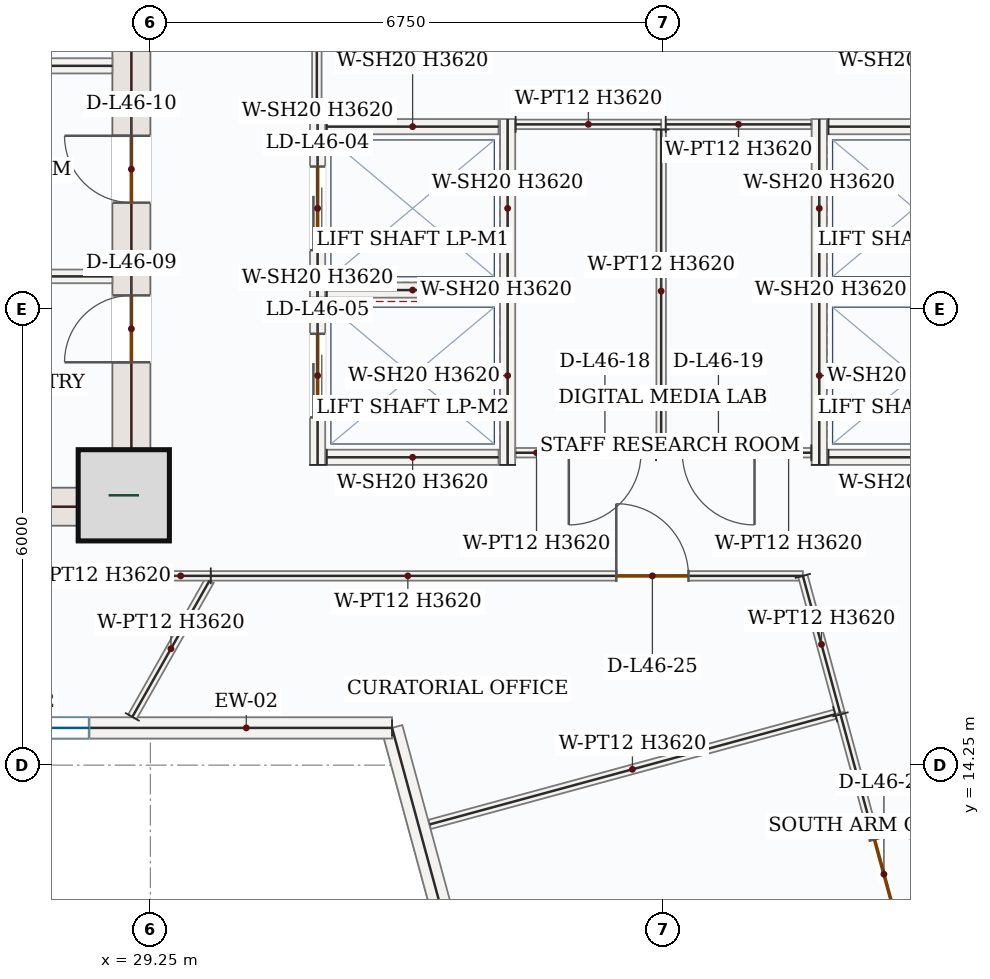
"""IFC4 building model, lengths in metres.
Left out: names, types, materials, properties, quantities, classifications, styles, units other than length and angle.
Written with IfcOpenShell. Run it as: python <this file> out.ifc"""

import sys

from ifc_helpers import new_model, si_unit, direction, frame, frame_2d, origin, origin_2d, place, context, subcontext, project, spatial, rectangle, extrude, source, transform, mapped, element, fill, save


model = new_model("IFC4")
c1 = context("Model", 3, precision=1e-05, world=origin(), true_north=direction((0.0, 1.0)))
c2 = subcontext(c1, "Body", "Model", "MODEL_VIEW")
j1 = project(units=[si_unit("LENGTHUNIT", "METRE"), si_unit("PLANEANGLEUNIT", "RADIAN")], contexts=[c1])
p1 = place(None, origin())
s1 = spatial("IfcSite", under=j1, at=p1, CompositionType="ELEMENT")
p2 = place(p1, origin())
s2 = spatial("IfcBuilding", under=s1, at=p2, CompositionType="ELEMENT")
p3 = place(p2, frame((0.0, 0.0, 198.0)))
s3 = spatial("IfcBuildingStorey", under=s2, at=p3, CompositionType="ELEMENT", Elevation=198.0)
p4 = place(p3, frame((29.0, 17.4, 0.0), z_axis=(0.0, 0.0, 1.0), x_axis=(0.0, 1.0, 0.0)))
e1 = element("IfcWall", 1, at=p4, inside=s3, PredefinedType="SHEAR", context=c2, shape_type="SweptSolid", body=[
    extrude(rectangle(XDim=8.55, YDim=0.5, at=frame_2d((4.275, 0.0))), origin(), (0.0, 0.0, 1.0), 3.62),
])
p5 = place(p4, frame((6.65, 0.0, 0.0)))
e2 = element("IfcOpeningElement", 2, at=p5, cuts=e1, PredefinedType="OPENING", context=c2, shape_type="SweptSolid", body=[
    extrude(rectangle(XDim=1.1, YDim=2.2, at=frame_2d((0.55, 1.1))), frame((0.0, 0.26, 0.0), z_axis=(0.0, -1.0, 0.0), x_axis=(1.0, 0.0, 0.0)), (0.0, 0.0, 1.0), 0.52),
])
p6 = place(p4, frame((2.15, 0.0, 0.0)))
e3 = element("IfcOpeningElement", 3, at=p6, cuts=e1, PredefinedType="OPENING", context=c2, shape_type="SweptSolid", body=[
    extrude(rectangle(XDim=0.88, YDim=2.1, at=frame_2d((0.44, 1.05))), frame((0.0, 0.26, 0.0), z_axis=(0.0, -1.0, 0.0), x_axis=(1.0, 0.0, 0.0)), (0.0, 0.0, 1.0), 0.52),
])
p7 = place(p4, frame((4.25, 0.0, 0.0)))
e4 = element("IfcOpeningElement", 4, at=p7, cuts=e1, PredefinedType="OPENING", context=c2, shape_type="SweptSolid", body=[
    extrude(rectangle(XDim=0.88, YDim=2.1, at=frame_2d((0.44, 1.05))), frame((0.0, 0.26, 0.0), z_axis=(0.0, -1.0, 0.0), x_axis=(1.0, 0.0, 0.0)), (0.0, 0.0, 1.0), 0.52),
])
m1 = source(origin(), c2, "Body", "SweptSolid", [
    extrude(rectangle(XDim=7.0, YDim=0.5, at=frame_2d((3.5, 0.0))), origin(), (0.0, 0.0, 1.0), 3.62),
])
p8 = place(p3, frame((21.75, 17.65, 0.0), z_axis=(0.0, 0.0, 1.0), x_axis=(1.0, 0.0, 0.0)))
e5 = element("IfcWall", 5, at=p8, inside=s3, PredefinedType="SHEAR", context=c2, shape_type="MappedRepresentation", body=[
    mapped(m1, transform((0.0, 0.0, 0.0), x_axis=(1.0, 0.0, 0.0), y_axis=(0.0, 1.0, 0.0), z_axis=(0.0, 0.0, 1.0), scale=1.0)),
])
m2 = source(origin(), c2, "Body", "SweptSolid", [
    extrude(rectangle(XDim=1.2, YDim=1.2, at=origin_2d()), origin(), (0.0, 0.0, 1.0), 3.9),
])
p9 = place(p3, frame((28.9, 17.8, 0.0), z_axis=(0.0, 0.0, 1.0), x_axis=(1.0, 0.0, 0.0)))
e6 = element("IfcColumn", 6, at=p9, inside=s3, PredefinedType="COLUMN", context=c2, shape_type="MappedRepresentation", body=[
    mapped(m2, transform((0.0, 0.0, 0.0), x_axis=(1.0, 0.0, 0.0), y_axis=(0.0, 1.0, 0.0), z_axis=(0.0, 0.0, 1.0), scale=1.0)),
])
p10 = place(p3, frame((34.649, 6.571, 0.0), z_axis=(0.0, 0.0, 1.0), x_axis=(-0.262192380254, 0.965015624608, 0.0)))
e7 = element("IfcWall", 7, at=p10, inside=s3, PredefinedType="SOLIDWALL", context=c2, shape_type="SweptSolid", body=[
    extrude(rectangle(XDim=8.465, YDim=0.28, at=frame_2d((4.232, 0.0))), origin(), (0.0, 0.0, 1.0), 3.62),
])
p11 = place(p10, frame((3.333, 0.0, 0.85)))
e8 = element("IfcOpeningElement", 8, at=p11, cuts=e7, PredefinedType="OPENING", context=c2, shape_type="SweptSolid", body=[
    extrude(rectangle(XDim=1.8, YDim=1.75, at=frame_2d((0.9, 0.875))), frame((0.0, 0.15, 0.0), z_axis=(0.0, -1.0, 0.0), x_axis=(1.0, 0.0, 0.0)), (0.0, 0.0, 1.0), 0.3),
])
p12 = place(p3, frame((32.429, 14.74, 0.0), z_axis=(0.0, 0.0, 1.0), x_axis=(-1.0, 0.0, 0.0)))
e9 = element("IfcWall", 9, at=p12, inside=s3, PredefinedType="SOLIDWALL", context=c2, shape_type="SweptSolid", body=[
    extrude(rectangle(XDim=9.771, YDim=0.28, at=frame_2d((4.886, 0.0))), origin(), (0.0, 0.0, 1.0), 3.62),
])
p13 = place(p12, frame((3.986, 0.0, 0.85)))
e10 = element("IfcOpeningElement", 10, at=p13, cuts=e9, PredefinedType="OPENING", context=c2, shape_type="SweptSolid", body=[
    extrude(rectangle(XDim=1.8, YDim=1.75, at=frame_2d((0.9, 0.875))), frame((0.0, 0.15, 0.0), z_axis=(0.0, -1.0, 0.0), x_axis=(1.0, 0.0, 0.0)), (0.0, 0.0, 1.0), 0.3),
])
m3 = source(origin(), c2, "Body", "SweptSolid", [
    extrude(rectangle(XDim=2.75, YDim=0.2, at=frame_2d((1.375, 0.0))), origin(), (0.0, 0.0, 1.0), 3.62),
])
p14 = place(p3, frame((26.0, 23.45, 0.0), z_axis=(0.0, 0.0, 1.0), x_axis=(1.0, 0.0, 0.0)))
e11 = element("IfcWall", 11, at=p14, inside=s3, PredefinedType="SOLIDWALL", context=c2, shape_type="MappedRepresentation", body=[
    mapped(m3, transform((0.0, 0.0, 0.0), x_axis=(1.0, 0.0, 0.0), y_axis=(0.0, 1.0, 0.0), z_axis=(0.0, 0.0, 1.0), scale=1.0)),
])
m4 = source(origin(), c2, "Body", "SweptSolid", [
    extrude(rectangle(XDim=2.75, YDim=0.18, at=frame_2d((1.375, 0.0))), origin(), (0.0, 0.0, 1.0), 3.62),
])
p15 = place(p3, frame((26.0, 20.68, 0.0), z_axis=(0.0, 0.0, 1.0), x_axis=(1.0, 0.0, 0.0)))
e12 = element("IfcWall", 12, at=p15, inside=s3, PredefinedType="PARTITIONING", context=c2, shape_type="MappedRepresentation", body=[
    mapped(m4, transform((0.0, 0.0, 0.0), x_axis=(1.0, 0.0, 0.0), y_axis=(0.0, 1.0, 0.0), z_axis=(0.0, 0.0, 1.0), scale=1.0)),
])
p16 = place(p3, frame((31.45, 20.4, 0.0), z_axis=(0.0, 0.0, 1.0), x_axis=(0.0, 1.0, 0.0)))
e13 = element("IfcWall", 13, at=p16, inside=s3, PredefinedType="SOLIDWALL", context=c2, shape_type="SweptSolid", body=[
    extrude(rectangle(XDim=2.35, YDim=0.2, at=frame_2d((1.175, 0.0))), origin(), (0.0, 0.0, 1.0), 3.62),
])
p17 = place(p16, frame((0.625, 0.0, 0.0)))
e14 = element("IfcOpeningElement", 14, at=p17, cuts=e13, PredefinedType="OPENING", context=c2, shape_type="SweptSolid", body=[
    extrude(rectangle(XDim=1.1, YDim=2.15, at=frame_2d((0.55, 1.075))), frame((0.0, 0.11, 0.0), z_axis=(0.0, -1.0, 0.0), x_axis=(1.0, 0.0, 0.0)), (0.0, 0.0, 1.0), 0.22),
])
m5 = source(origin(), c2, "Body", "SweptSolid", [
    extrude(rectangle(XDim=2.35, YDim=0.2, at=frame_2d((1.175, 0.0))), origin(), (0.0, 0.0, 1.0), 3.62),
])
p18 = place(p3, frame((33.95, 20.4, 0.0), z_axis=(0.0, 0.0, 1.0), x_axis=(0.0, 1.0, 0.0)))
e15 = element("IfcWall", 15, at=p18, inside=s3, PredefinedType="SOLIDWALL", context=c2, shape_type="MappedRepresentation", body=[
    mapped(m5, transform((0.0, 0.0, 0.0), x_axis=(1.0, 0.0, 0.0), y_axis=(0.0, 1.0, 0.0), z_axis=(0.0, 0.0, 1.0), scale=1.0)),
])
m6 = source(origin(), c2, "Body", "SweptSolid", [
    extrude(rectangle(XDim=2.26, YDim=0.2, at=frame_2d((1.13, 0.0))), origin(), (0.0, 0.0, 1.0), 3.62),
])
for number, where, z_axis, x_axis in (
    (16, (31.57, 20.5, 0.0), (0.0, 0.0, 1.0), (1.0, 0.0, 0.0)),
    (17, (31.57, 22.65, 0.0), (0.0, 0.0, 1.0), (1.0, 0.0, 0.0)),
):
    element("IfcWall", number, at=place(p3, frame(where, z_axis=z_axis, x_axis=x_axis)), inside=s3, PredefinedType="SOLIDWALL", context=c2, shape_type="MappedRepresentation", body=[
        mapped(m6, transform((0.0, 0.0, 0.0), x_axis=(1.0, 0.0, 0.0), y_axis=(0.0, 1.0, 0.0), z_axis=(0.0, 0.0, 1.0), scale=1.0)),
    ])
p19 = place(p3, frame((31.45, 18.2, 0.0), z_axis=(0.0, 0.0, 1.0), x_axis=(0.0, 1.0, 0.0)))
e18 = element("IfcWall", 18, at=p19, inside=s3, PredefinedType="SOLIDWALL", context=c2, shape_type="SweptSolid", body=[
    extrude(rectangle(XDim=2.35, YDim=0.2, at=frame_2d((1.175, 0.0))), origin(), (0.0, 0.0, 1.0), 3.62),
])
p20 = place(p19, frame((0.625, 0.0, 0.0)))
e19 = element("IfcOpeningElement", 19, at=p20, cuts=e18, PredefinedType="OPENING", context=c2, shape_type="SweptSolid", body=[
    extrude(rectangle(XDim=1.1, YDim=2.15, at=frame_2d((0.55, 1.075))), frame((0.0, 0.11, 0.0), z_axis=(0.0, -1.0, 0.0), x_axis=(1.0, 0.0, 0.0)), (0.0, 0.0, 1.0), 0.22),
])
p21 = place(p3, frame((33.95, 18.2, 0.0), z_axis=(0.0, 0.0, 1.0), x_axis=(0.0, 1.0, 0.0)))
e20 = element("IfcWall", 20, at=p21, inside=s3, PredefinedType="SOLIDWALL", context=c2, shape_type="MappedRepresentation", body=[
    mapped(m5, transform((0.0, 0.0, 0.0), x_axis=(1.0, 0.0, 0.0), y_axis=(0.0, 1.0, 0.0), z_axis=(0.0, 0.0, 1.0), scale=1.0)),
])
p22 = place(p3, frame((31.57, 18.3, 0.0), z_axis=(0.0, 0.0, 1.0), x_axis=(1.0, 0.0, 0.0)))
e21 = element("IfcWall", 21, at=p22, inside=s3, PredefinedType="SOLIDWALL", context=c2, shape_type="MappedRepresentation", body=[
    mapped(m6, transform((0.0, 0.0, 0.0), x_axis=(1.0, 0.0, 0.0), y_axis=(0.0, 1.0, 0.0), z_axis=(0.0, 0.0, 1.0), scale=1.0)),
])
p23 = place(p3, frame((38.05, 20.4, 0.0), z_axis=(0.0, 0.0, 1.0), x_axis=(0.0, 1.0, 0.0)))
e22 = element("IfcWall", 22, at=p23, inside=s3, PredefinedType="SOLIDWALL", context=c2, shape_type="MappedRepresentation", body=[
    mapped(m5, transform((0.0, 0.0, 0.0), x_axis=(1.0, 0.0, 0.0), y_axis=(0.0, 1.0, 0.0), z_axis=(0.0, 0.0, 1.0), scale=1.0)),
])
for number, where, z_axis, x_axis in (
    (23, (38.17, 20.5, 0.0), (0.0, 0.0, 1.0), (1.0, 0.0, 0.0)),
    (24, (38.17, 22.65, 0.0), (0.0, 0.0, 1.0), (1.0, 0.0, 0.0)),
):
    element("IfcWall", number, at=place(p3, frame(where, z_axis=z_axis, x_axis=x_axis)), inside=s3, PredefinedType="SOLIDWALL", context=c2, shape_type="MappedRepresentation", body=[
        mapped(m6, transform((0.0, 0.0, 0.0), x_axis=(1.0, 0.0, 0.0), y_axis=(0.0, 1.0, 0.0), z_axis=(0.0, 0.0, 1.0), scale=1.0)),
    ])
p24 = place(p3, frame((38.05, 18.2, 0.0), z_axis=(0.0, 0.0, 1.0), x_axis=(0.0, 1.0, 0.0)))
e25 = element("IfcWall", 25, at=p24, inside=s3, PredefinedType="SOLIDWALL", context=c2, shape_type="MappedRepresentation", body=[
    mapped(m5, transform((0.0, 0.0, 0.0), x_axis=(1.0, 0.0, 0.0), y_axis=(0.0, 1.0, 0.0), z_axis=(0.0, 0.0, 1.0), scale=1.0)),
])
p25 = place(p3, frame((38.17, 18.3, 0.0), z_axis=(0.0, 0.0, 1.0), x_axis=(1.0, 0.0, 0.0)))
e26 = element("IfcWall", 26, at=p25, inside=s3, PredefinedType="SOLIDWALL", context=c2, shape_type="MappedRepresentation", body=[
    mapped(m6, transform((0.0, 0.0, 0.0), x_axis=(1.0, 0.0, 0.0), y_axis=(0.0, 1.0, 0.0), z_axis=(0.0, 0.0, 1.0), scale=1.0)),
])
m7 = source(origin(), c2, "Body", "SweptSolid", [
    extrude(rectangle(XDim=1.915, YDim=0.125, at=frame_2d((0.958, 0.0))), origin(), (0.0, 0.0, 1.0), 3.62),
])
p26 = place(p3, frame((34.055, 22.68, 0.0), z_axis=(0.0, 0.0, 1.0), x_axis=(1.0, 0.0, 0.0)))
e27 = element("IfcWall", 27, at=p26, inside=s3, PredefinedType="PARTITIONING", context=c2, shape_type="MappedRepresentation", body=[
    mapped(m7, transform((0.0, 0.0, 0.0), x_axis=(1.0, 0.0, 0.0), y_axis=(0.0, 1.0, 0.0), z_axis=(0.0, 0.0, 1.0), scale=1.0)),
])
m8 = source(origin(), c2, "Body", "SweptSolid", [
    extrude(rectangle(XDim=4.252, YDim=0.125, at=frame_2d((2.126, 0.0))), origin(), (0.0, 0.0, 1.0), 3.62),
])
p27 = place(p3, frame((35.97, 22.613, 0.0), z_axis=(0.0, 0.0, 1.0), x_axis=(0.0, -1.0, 0.0)))
e28 = element("IfcWall", 28, at=p27, inside=s3, PredefinedType="PARTITIONING", context=c2, shape_type="MappedRepresentation", body=[
    mapped(m8, transform((0.0, 0.0, 0.0), x_axis=(1.0, 0.0, 0.0), y_axis=(0.0, 1.0, 0.0), z_axis=(0.0, 0.0, 1.0), scale=1.0)),
])
p28 = place(p3, frame((35.903, 18.36, 0.0), z_axis=(0.0, 0.0, 1.0), x_axis=(-1.0, 0.0, 0.0)))
e29 = element("IfcWall", 29, at=p28, inside=s3, PredefinedType="PARTITIONING", context=c2, shape_type="SweptSolid", body=[
    extrude(rectangle(XDim=1.848, YDim=0.125, at=frame_2d((0.924, 0.0))), origin(), (0.0, 0.0, 1.0), 3.62),
])
p29 = place(p28, frame((0.198, 0.0, 0.0)))
e30 = element("IfcOpeningElement", 30, at=p29, cuts=e29, PredefinedType="OPENING", context=c2, shape_type="SweptSolid", body=[
    extrude(rectangle(XDim=0.95, YDim=2.15, at=frame_2d((0.475, 1.075))), frame((0.0, 0.073, 0.0), z_axis=(0.0, -1.0, 0.0), x_axis=(1.0, 0.0, 0.0)), (0.0, 0.0, 1.0), 0.145),
])
p30 = place(p3, frame((36.03, 22.68, 0.0), z_axis=(0.0, 0.0, 1.0), x_axis=(1.0, 0.0, 0.0)))
e31 = element("IfcWall", 31, at=p30, inside=s3, PredefinedType="PARTITIONING", context=c2, shape_type="MappedRepresentation", body=[
    mapped(m7, transform((0.0, 0.0, 0.0), x_axis=(1.0, 0.0, 0.0), y_axis=(0.0, 1.0, 0.0), z_axis=(0.0, 0.0, 1.0), scale=1.0)),
])
p31 = place(p3, frame((37.945, 18.36, 0.0), z_axis=(0.0, 0.0, 1.0), x_axis=(-1.0, 0.0, 0.0)))
e32 = element("IfcWall", 32, at=p31, inside=s3, PredefinedType="PARTITIONING", context=c2, shape_type="SweptSolid", body=[
    extrude(rectangle(XDim=1.907, YDim=0.125, at=frame_2d((0.954, 0.0))), origin(), (0.0, 0.0, 1.0), 3.62),
])
p32 = place(p31, frame((0.747, 0.0, 0.0)))
e33 = element("IfcOpeningElement", 33, at=p32, cuts=e32, PredefinedType="OPENING", context=c2, shape_type="SweptSolid", body=[
    extrude(rectangle(XDim=0.95, YDim=2.15, at=frame_2d((0.475, 1.075))), frame((0.0, 0.073, 0.0), z_axis=(0.0, -1.0, 0.0), x_axis=(1.0, 0.0, 0.0)), (0.0, 0.0, 1.0), 0.145),
])
p33 = place(p3, frame((30.045, 16.74, 0.0), z_axis=(0.0, 0.0, 1.0), x_axis=(1.0, 0.0, 0.0)))
e34 = element("IfcWall", 34, at=p33, inside=s3, PredefinedType="PARTITIONING", context=c2, shape_type="SweptSolid", body=[
    extrude(rectangle(XDim=7.79, YDim=0.125, at=frame_2d((3.895, 0.0))), origin(), (0.0, 0.0, 1.0), 3.62),
])
p34 = place(p33, frame((5.335, 0.0, 0.0)))
e35 = element("IfcOpeningElement", 35, at=p34, cuts=e34, PredefinedType="OPENING", context=c2, shape_type="SweptSolid", body=[
    extrude(rectangle(XDim=0.95, YDim=2.15, at=frame_2d((0.475, 1.075))), frame((0.0, 0.073, 0.0), z_axis=(0.0, -1.0, 0.0), x_axis=(1.0, 0.0, 0.0)), (0.0, 0.0, 1.0), 0.145),
])
m9 = source(origin(), c2, "Body", "SweptSolid", [
    extrude(rectangle(XDim=1.868, YDim=0.125, at=frame_2d((0.934, 0.0))), origin(), (0.0, 0.0, 1.0), 3.62),
])
p35 = place(p3, frame((37.834, 16.74, 0.0), z_axis=(0.0, 0.0, 1.0), x_axis=(0.262166249224, -0.965022723964, 0.0)))
e36 = element("IfcWall", 36, at=p35, inside=s3, PredefinedType="PARTITIONING", context=c2, shape_type="MappedRepresentation", body=[
    mapped(m9, transform((0.0, 0.0, 0.0), x_axis=(1.0, 0.0, 0.0), y_axis=(0.0, 1.0, 0.0), z_axis=(0.0, 0.0, 1.0), scale=1.0)),
])
m10 = source(origin(), c2, "Body", "SweptSolid", [
    extrude(rectangle(XDim=5.527, YDim=0.125, at=frame_2d((2.764, 0.0))), origin(), (0.0, 0.0, 1.0), 3.62),
])
p36 = place(p3, frame((38.259, 14.92, 0.0), z_axis=(0.0, 0.0, 1.0), x_axis=(-0.965004985248, -0.262231535949, 0.0)))
e37 = element("IfcWall", 37, at=p36, inside=s3, PredefinedType="PARTITIONING", context=c2, shape_type="MappedRepresentation", body=[
    mapped(m10, transform((0.0, 0.0, 0.0), x_axis=(1.0, 0.0, 0.0), y_axis=(0.0, 1.0, 0.0), z_axis=(0.0, 0.0, 1.0), scale=1.0)),
])
m11 = source(origin(), c2, "Body", "SweptSolid", [
    extrude(rectangle(XDim=2.061, YDim=0.125, at=frame_2d((1.03, 0.0))), origin(), (0.0, 0.0, 1.0), 3.62),
])
p37 = place(p3, frame((29.013, 14.885, 0.0), z_axis=(0.0, 0.0, 1.0), x_axis=(0.492818271576, 0.870132260752, 0.0)))
e38 = element("IfcWall", 38, at=p37, inside=s3, PredefinedType="PARTITIONING", context=c2, shape_type="MappedRepresentation", body=[
    mapped(m11, transform((0.0, 0.0, 0.0), x_axis=(1.0, 0.0, 0.0), y_axis=(0.0, 1.0, 0.0), z_axis=(0.0, 0.0, 1.0), scale=1.0)),
])
m12 = source(origin(), c2, "Body", "SweptSolid", [
    extrude(rectangle(XDim=3.11, YDim=0.125, at=frame_2d((1.555, 0.0))), origin(), (0.0, 0.0, 1.0), 3.62),
])
p38 = place(p3, frame((31.44, 22.75, 0.0), z_axis=(0.0, 0.0, 1.0), x_axis=(0.0, 1.0, 0.0)))
e39 = element("IfcWall", 39, at=p38, inside=s3, PredefinedType="PARTITIONING", context=c2, shape_type="MappedRepresentation", body=[
    mapped(m12, transform((0.0, 0.0, 0.0), x_axis=(1.0, 0.0, 0.0), y_axis=(0.0, 1.0, 0.0), z_axis=(0.0, 0.0, 1.0), scale=1.0)),
])
p39 = place(p3, frame((38.329, 14.918, 0.0), z_axis=(0.0, 0.0, 1.0), x_axis=(0.262166936223, -0.965022537328, 0.0)))
e40 = element("IfcWall", 40, at=p39, inside=s3, PredefinedType="PARTITIONING", context=c2, shape_type="SweptSolid", body=[
    extrude(rectangle(XDim=8.695, YDim=0.125, at=frame_2d((4.348, 0.0))), origin(), (0.0, 0.0, 1.0), 3.62),
])
p40 = place(p39, frame((1.704, 0.0, 0.0)))
e41 = element("IfcOpeningElement", 41, at=p40, cuts=e40, PredefinedType="OPENING", context=c2, shape_type="SweptSolid", body=[
    extrude(rectangle(XDim=0.95, YDim=2.15, at=frame_2d((0.475, 1.075))), frame((0.0, 0.073, 0.0), z_axis=(0.0, -1.0, 0.0), x_axis=(1.0, 0.0, 0.0)), (0.0, 0.0, 1.0), 0.145),
])
m13 = source(origin(), c2, "Body", "SweptSolid", [
    extrude(rectangle(XDim=0.791, YDim=0.125, at=frame_2d((0.396, 0.0))), origin(), (0.0, 0.0, 1.0), 3.62),
])
p41 = place(p3, frame((29.253, 16.74, 0.0), z_axis=(0.0, 0.0, 1.0), x_axis=(0.999999809598, -0.000617093372, 0.0)))
e42 = element("IfcWall", 42, at=p41, inside=s3, PredefinedType="PARTITIONING", context=c2, shape_type="MappedRepresentation", body=[
    mapped(m13, transform((0.0, 0.0, 0.0), x_axis=(1.0, 0.0, 0.0), y_axis=(0.0, 1.0, 0.0), z_axis=(0.0, 0.0, 1.0), scale=1.0)),
])
m14 = source(origin(), c2, "Body", "SweptSolid", [
    extrude(rectangle(XDim=1.8, YDim=1.75, at=frame_2d((0.9, 0.875))), frame((0.0, 0.03, 0.0), z_axis=(0.0, -1.0, 0.0), x_axis=(1.0, 0.0, 0.0)), (0.0, 0.0, 1.0), 0.06),
])
p42 = place(p13, origin())
e43 = element("IfcWindow", 43, at=p42, inside=s3, PartitioningType="DOUBLE_PANEL_VERTICAL", PredefinedType="WINDOW", context=c2, shape_type="MappedRepresentation", body=[
    mapped(m14, transform((0.0, 0.0, 0.0), x_axis=(1.0, 0.0, 0.0), y_axis=(0.0, 1.0, 0.0), z_axis=(0.0, 0.0, 1.0), scale=1.0)),
])
fill(e10, e43)
m15 = source(origin(), c2, "Body", "SweptSolid", [
    extrude(rectangle(XDim=0.88, YDim=2.1, at=frame_2d((0.44, 1.05))), frame((0.0, 0.025, 0.0), z_axis=(0.0, -1.0, 0.0), x_axis=(1.0, 0.0, 0.0)), (0.0, 0.0, 1.0), 0.05),
])
p43 = place(p6, origin())
e44 = element("IfcDoor", 44, at=p43, inside=s3, OperationType="SINGLE_SWING_LEFT", PredefinedType="DOOR", context=c2, shape_type="MappedRepresentation", body=[
    mapped(m15, transform((0.0, 0.0, 0.0), x_axis=(1.0, 0.0, 0.0), y_axis=(0.0, 1.0, 0.0), z_axis=(0.0, 0.0, 1.0), scale=1.0)),
])
fill(e3, e44)
p44 = place(p7, origin())
e45 = element("IfcDoor", 45, at=p44, inside=s3, OperationType="SINGLE_SWING_RIGHT", PredefinedType="DOOR", context=c2, shape_type="MappedRepresentation", body=[
    mapped(m15, transform((0.0, 0.0, 0.0), x_axis=(1.0, 0.0, 0.0), y_axis=(0.0, 1.0, 0.0), z_axis=(0.0, 0.0, 1.0), scale=1.0)),
])
fill(e4, e45)
m16 = source(origin(), c2, "Body", "SweptSolid", [
    extrude(rectangle(XDim=1.1, YDim=2.15, at=frame_2d((0.55, 1.075))), frame((0.0, 0.025, 0.0), z_axis=(0.0, -1.0, 0.0), x_axis=(1.0, 0.0, 0.0)), (0.0, 0.0, 1.0), 0.05),
])
p45 = place(p17, origin())
e46 = element("IfcDoor", 46, at=p45, inside=s3, OperationType="DOUBLE_DOOR_SLIDING", PredefinedType="DOOR", context=c2, shape_type="MappedRepresentation", body=[
    mapped(m16, transform((0.0, 0.0, 0.0), x_axis=(1.0, 0.0, 0.0), y_axis=(0.0, 1.0, 0.0), z_axis=(0.0, 0.0, 1.0), scale=1.0)),
])
fill(e14, e46)
p46 = place(p20, origin())
e47 = element("IfcDoor", 47, at=p46, inside=s3, OperationType="DOUBLE_DOOR_SLIDING", PredefinedType="DOOR", context=c2, shape_type="MappedRepresentation", body=[
    mapped(m16, transform((0.0, 0.0, 0.0), x_axis=(1.0, 0.0, 0.0), y_axis=(0.0, 1.0, 0.0), z_axis=(0.0, 0.0, 1.0), scale=1.0)),
])
fill(e19, e47)
m17 = source(origin(), c2, "Body", "SweptSolid", [
    extrude(rectangle(XDim=0.95, YDim=2.15, at=frame_2d((0.475, 1.075))), frame((0.0, 0.025, 0.0), z_axis=(0.0, -1.0, 0.0), x_axis=(1.0, 0.0, 0.0)), (0.0, 0.0, 1.0), 0.05),
])
p47 = place(p29, origin())
e48 = element("IfcDoor", 48, at=p47, inside=s3, OperationType="SINGLE_SWING_RIGHT", PredefinedType="DOOR", context=c2, shape_type="MappedRepresentation", body=[
    mapped(m17, transform((0.0, 0.0, 0.0), x_axis=(1.0, 0.0, 0.0), y_axis=(0.0, 1.0, 0.0), z_axis=(0.0, 0.0, 1.0), scale=1.0)),
])
fill(e30, e48)
p48 = place(p32, origin())
e49 = element("IfcDoor", 49, at=p48, inside=s3, OperationType="SINGLE_SWING_LEFT", PredefinedType="DOOR", context=c2, shape_type="MappedRepresentation", body=[
    mapped(m17, transform((0.0, 0.0, 0.0), x_axis=(1.0, 0.0, 0.0), y_axis=(0.0, 1.0, 0.0), z_axis=(0.0, 0.0, 1.0), scale=1.0)),
])
fill(e33, e49)
p49 = place(p34, origin())
e50 = element("IfcDoor", 50, at=p49, inside=s3, OperationType="SINGLE_SWING_LEFT", PredefinedType="DOOR", context=c2, shape_type="MappedRepresentation", body=[
    mapped(m17, transform((0.0, 0.0, 0.0), x_axis=(1.0, 0.0, 0.0), y_axis=(0.0, 1.0, 0.0), z_axis=(0.0, 0.0, 1.0), scale=1.0)),
])
fill(e35, e50)
p50 = place(p40, origin())
e51 = element("IfcDoor", 51, at=p50, inside=s3, OperationType="SINGLE_SWING_RIGHT", PredefinedType="DOOR", context=c2, shape_type="MappedRepresentation", body=[
    mapped(m17, transform((0.0, 0.0, 0.0), x_axis=(1.0, 0.0, 0.0), y_axis=(0.0, 1.0, 0.0), z_axis=(0.0, 0.0, 1.0), scale=1.0)),
])
fill(e41, e51)
save(model, sys.argv[1])
